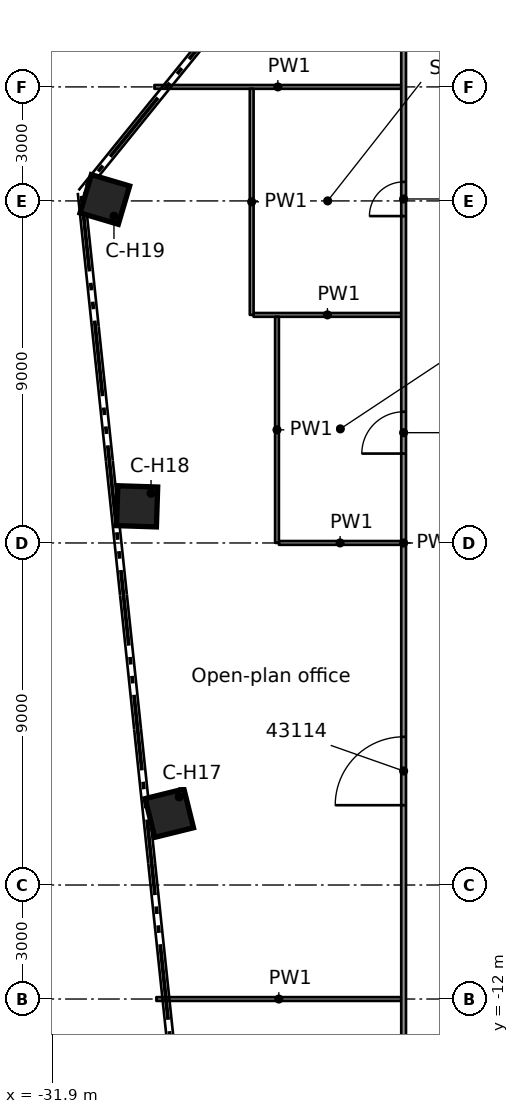
"""IFC4 building model, lengths in metres.
Left out: names, types, materials, properties, quantities, classifications, styles, units other than length and angle.
Written with IfcOpenShell. Run it as: python <this file> out.ifc"""

import sys

from ifc_helpers import new_model, si_unit, direction, frame, frame_2d, origin, origin_2d, place, context, subcontext, project, spatial, rectangle, extrude, element, fill, save


model = new_model("IFC4")
c1 = context("Model", 3, precision=1e-05, world=origin(), true_north=direction((0.0, 1.0)))
c2 = subcontext(c1, "Body", "Model", "MODEL_VIEW")
j1 = project(units=[si_unit("LENGTHUNIT", "METRE"), si_unit("PLANEANGLEUNIT", "RADIAN")], contexts=[c1])
p1 = place(None, origin())
s1 = spatial("IfcSite", under=j1, at=p1, CompositionType="ELEMENT")
p2 = place(p1, origin())
s2 = spatial("IfcBuilding", under=s1, at=p2, CompositionType="ELEMENT")
p3 = place(p2, frame((0.0, 0.0, 214.0)))
s3 = spatial("IfcBuildingStorey", under=s2, at=p3, CompositionType="ELEMENT", Elevation=214.0)
for number, where, z_axis, x_axis in (
    (1, (-28.815, -7.11, 0.0), (0.0, 0.0, 1.0), (-0.971, -0.24, 0.0)),
    (2, (-29.663, 0.964, 0.0), (0.0, 0.0, 1.0), (-0.999, 0.032, 0.0)),
    (3, (-30.512, 9.038, 0.0), (0.0, 0.0, 1.0), (-0.959, 0.284, 0.0)),
):
    element("IfcColumn", number, at=place(p3, frame(where, z_axis=z_axis, x_axis=x_axis)), inside=s3, PredefinedType="COLUMN", context=c2, shape_type="SweptSolid", body=[
        extrude(rectangle(XDim=1.05, YDim=1.05, at=origin_2d()), origin(), (0.0, 0.0, 1.0), 3.5),
    ])
p4 = place(p3, frame((-29.156, -12.0, 0.0), z_axis=(0.0, 0.0, 1.0), x_axis=(1.0, 0.0, 0.0)))
e4 = element("IfcWall", 4, at=p4, inside=s3, PredefinedType="PARTITIONING", context=c2, shape_type="SweptSolid", body=[
    extrude(rectangle(XDim=6.444, YDim=0.1, at=frame_2d((3.222, 0.0))), origin(), (0.0, 0.0, 1.0), 3.06),
])
p5 = place(p3, frame((-25.931, 0.001, 0.0), z_axis=(0.0, 0.0, 1.0), x_axis=(1.0, 0.0, 0.0)))
e5 = element("IfcWall", 5, at=p5, inside=s3, PredefinedType="PARTITIONING", context=c2, shape_type="SweptSolid", body=[
    extrude(rectangle(XDim=3.219, YDim=0.1, at=frame_2d((1.609, 0.0))), origin(), (0.0, 0.0, 1.0), 3.06),
])
p6 = place(p3, frame((-26.598, 6.001, 0.0), z_axis=(0.0, 0.0, 1.0), x_axis=(1.0, 0.0, 0.0)))
e6 = element("IfcWall", 6, at=p6, inside=s3, PredefinedType="PARTITIONING", context=c2, shape_type="SweptSolid", body=[
    extrude(rectangle(XDim=3.886, YDim=0.1, at=frame_2d((1.943, 0.0))), origin(), (0.0, 0.0, 1.0), 3.06),
])
p7 = place(p3, frame((-29.207, 12.0, 0.0), z_axis=(0.0, 0.0, 1.0), x_axis=(1.0, 0.0, 0.0)))
e7 = element("IfcWall", 7, at=p7, inside=s3, PredefinedType="PARTITIONING", context=c2, shape_type="SweptSolid", body=[
    extrude(rectangle(XDim=6.495, YDim=0.1, at=frame_2d((3.248, 0.0))), origin(), (0.0, 0.0, 1.0), 3.06),
])
p8 = place(p3, frame((-22.65, -15.651, 0.0), z_axis=(0.0, 0.0, 1.0), x_axis=(0.0, 1.0, 0.0)))
e8 = element("IfcWall", 8, at=p8, inside=s3, PredefinedType="PARTITIONING", context=c2, shape_type="SweptSolid", body=[
    extrude(rectangle(XDim=31.302, YDim=0.125, at=frame_2d((15.651, 0.0))), origin(), (0.0, 0.0, 1.0), 3.06),
])
p9 = place(p8, frame((0.85, 0.0, 0.0)))
e9 = element("IfcOpeningElement", 9, at=p9, cuts=e8, PredefinedType="OPENING", context=c2, shape_type="SweptSolid", body=[
    extrude(rectangle(XDim=1.8, YDim=2.1, at=frame_2d((0.9, 1.05))), frame((0.0, 0.073, 0.0), z_axis=(0.0, -1.0, 0.0), x_axis=(1.0, 0.0, 0.0)), (0.0, 0.0, 1.0), 0.145),
])
p10 = place(p8, frame((8.751, 0.0, 0.0)))
e10 = element("IfcOpeningElement", 10, at=p10, cuts=e8, PredefinedType="OPENING", context=c2, shape_type="SweptSolid", body=[
    extrude(rectangle(XDim=1.8, YDim=2.1, at=frame_2d((0.9, 1.05))), frame((0.0, 0.073, 0.0), z_axis=(0.0, -1.0, 0.0), x_axis=(1.0, 0.0, 0.0)), (0.0, 0.0, 1.0), 0.145),
])
p11 = place(p8, frame((24.252, 0.0, 0.0)))
e11 = element("IfcOpeningElement", 11, at=p11, cuts=e8, PredefinedType="OPENING", context=c2, shape_type="SweptSolid", body=[
    extrude(rectangle(XDim=0.9, YDim=2.1, at=frame_2d((0.45, 1.05))), frame((0.0, 0.073, 0.0), z_axis=(0.0, -1.0, 0.0), x_axis=(1.0, 0.0, 0.0)), (0.0, 0.0, 1.0), 0.145),
])
p12 = place(p8, frame((18.003, 0.0, 0.0)))
e12 = element("IfcOpeningElement", 12, at=p12, cuts=e8, PredefinedType="OPENING", context=c2, shape_type="SweptSolid", body=[
    extrude(rectangle(XDim=1.1, YDim=2.1, at=frame_2d((0.55, 1.05))), frame((0.0, 0.073, 0.0), z_axis=(0.0, -1.0, 0.0), x_axis=(1.0, 0.0, 0.0)), (0.0, 0.0, 1.0), 0.145),
])
for number, where, z_axis, x_axis in (
    (13, (-25.982, 0.002, 0.0), (0.0, 0.0, 1.0), (0.0, 1.0, 0.0)),
    (14, (-26.648, 6.001, 0.0), (0.0, 0.0, 1.0), (0.0, 1.0, 0.0)),
):
    element("IfcWall", number, at=place(p3, frame(where, z_axis=z_axis, x_axis=x_axis)), inside=s3, PredefinedType="PARTITIONING", context=c2, shape_type="SweptSolid", body=[
        extrude(rectangle(XDim=5.949, YDim=0.1, at=frame_2d((2.975, 0.0))), origin(), (0.0, 0.0, 1.0), 3.06),
    ])
p13 = place(p10, origin())
e15 = element("IfcDoor", 15, at=p13, inside=s3, OperationType="DOUBLE_DOOR_SINGLE_SWING", PredefinedType="DOOR", context=c2, shape_type="SweptSolid", body=[
    extrude(rectangle(XDim=1.8, YDim=2.1, at=frame_2d((0.9, 1.05))), frame((0.0, 0.025, 0.0), z_axis=(0.0, -1.0, 0.0), x_axis=(1.0, 0.0, 0.0)), (0.0, 0.0, 1.0), 0.05),
])
fill(e10, e15)
p14 = place(p11, origin())
e16 = element("IfcDoor", 16, at=p14, inside=s3, OperationType="SINGLE_SWING_RIGHT", PredefinedType="DOOR", context=c2, shape_type="SweptSolid", body=[
    extrude(rectangle(XDim=0.9, YDim=2.1, at=frame_2d((0.45, 1.05))), frame((0.0, 0.025, 0.0), z_axis=(0.0, -1.0, 0.0), x_axis=(1.0, 0.0, 0.0)), (0.0, 0.0, 1.0), 0.05),
])
fill(e11, e16)
p15 = place(p12, origin())
e17 = element("IfcDoor", 17, at=p15, inside=s3, OperationType="SINGLE_SWING_RIGHT", PredefinedType="DOOR", context=c2, shape_type="SweptSolid", body=[
    extrude(rectangle(XDim=1.1, YDim=2.1, at=frame_2d((0.55, 1.05))), frame((0.0, 0.025, 0.0), z_axis=(0.0, -1.0, 0.0), x_axis=(1.0, 0.0, 0.0)), (0.0, 0.0, 1.0), 0.05),
])
fill(e12, e17)
save(model, sys.argv[1])
